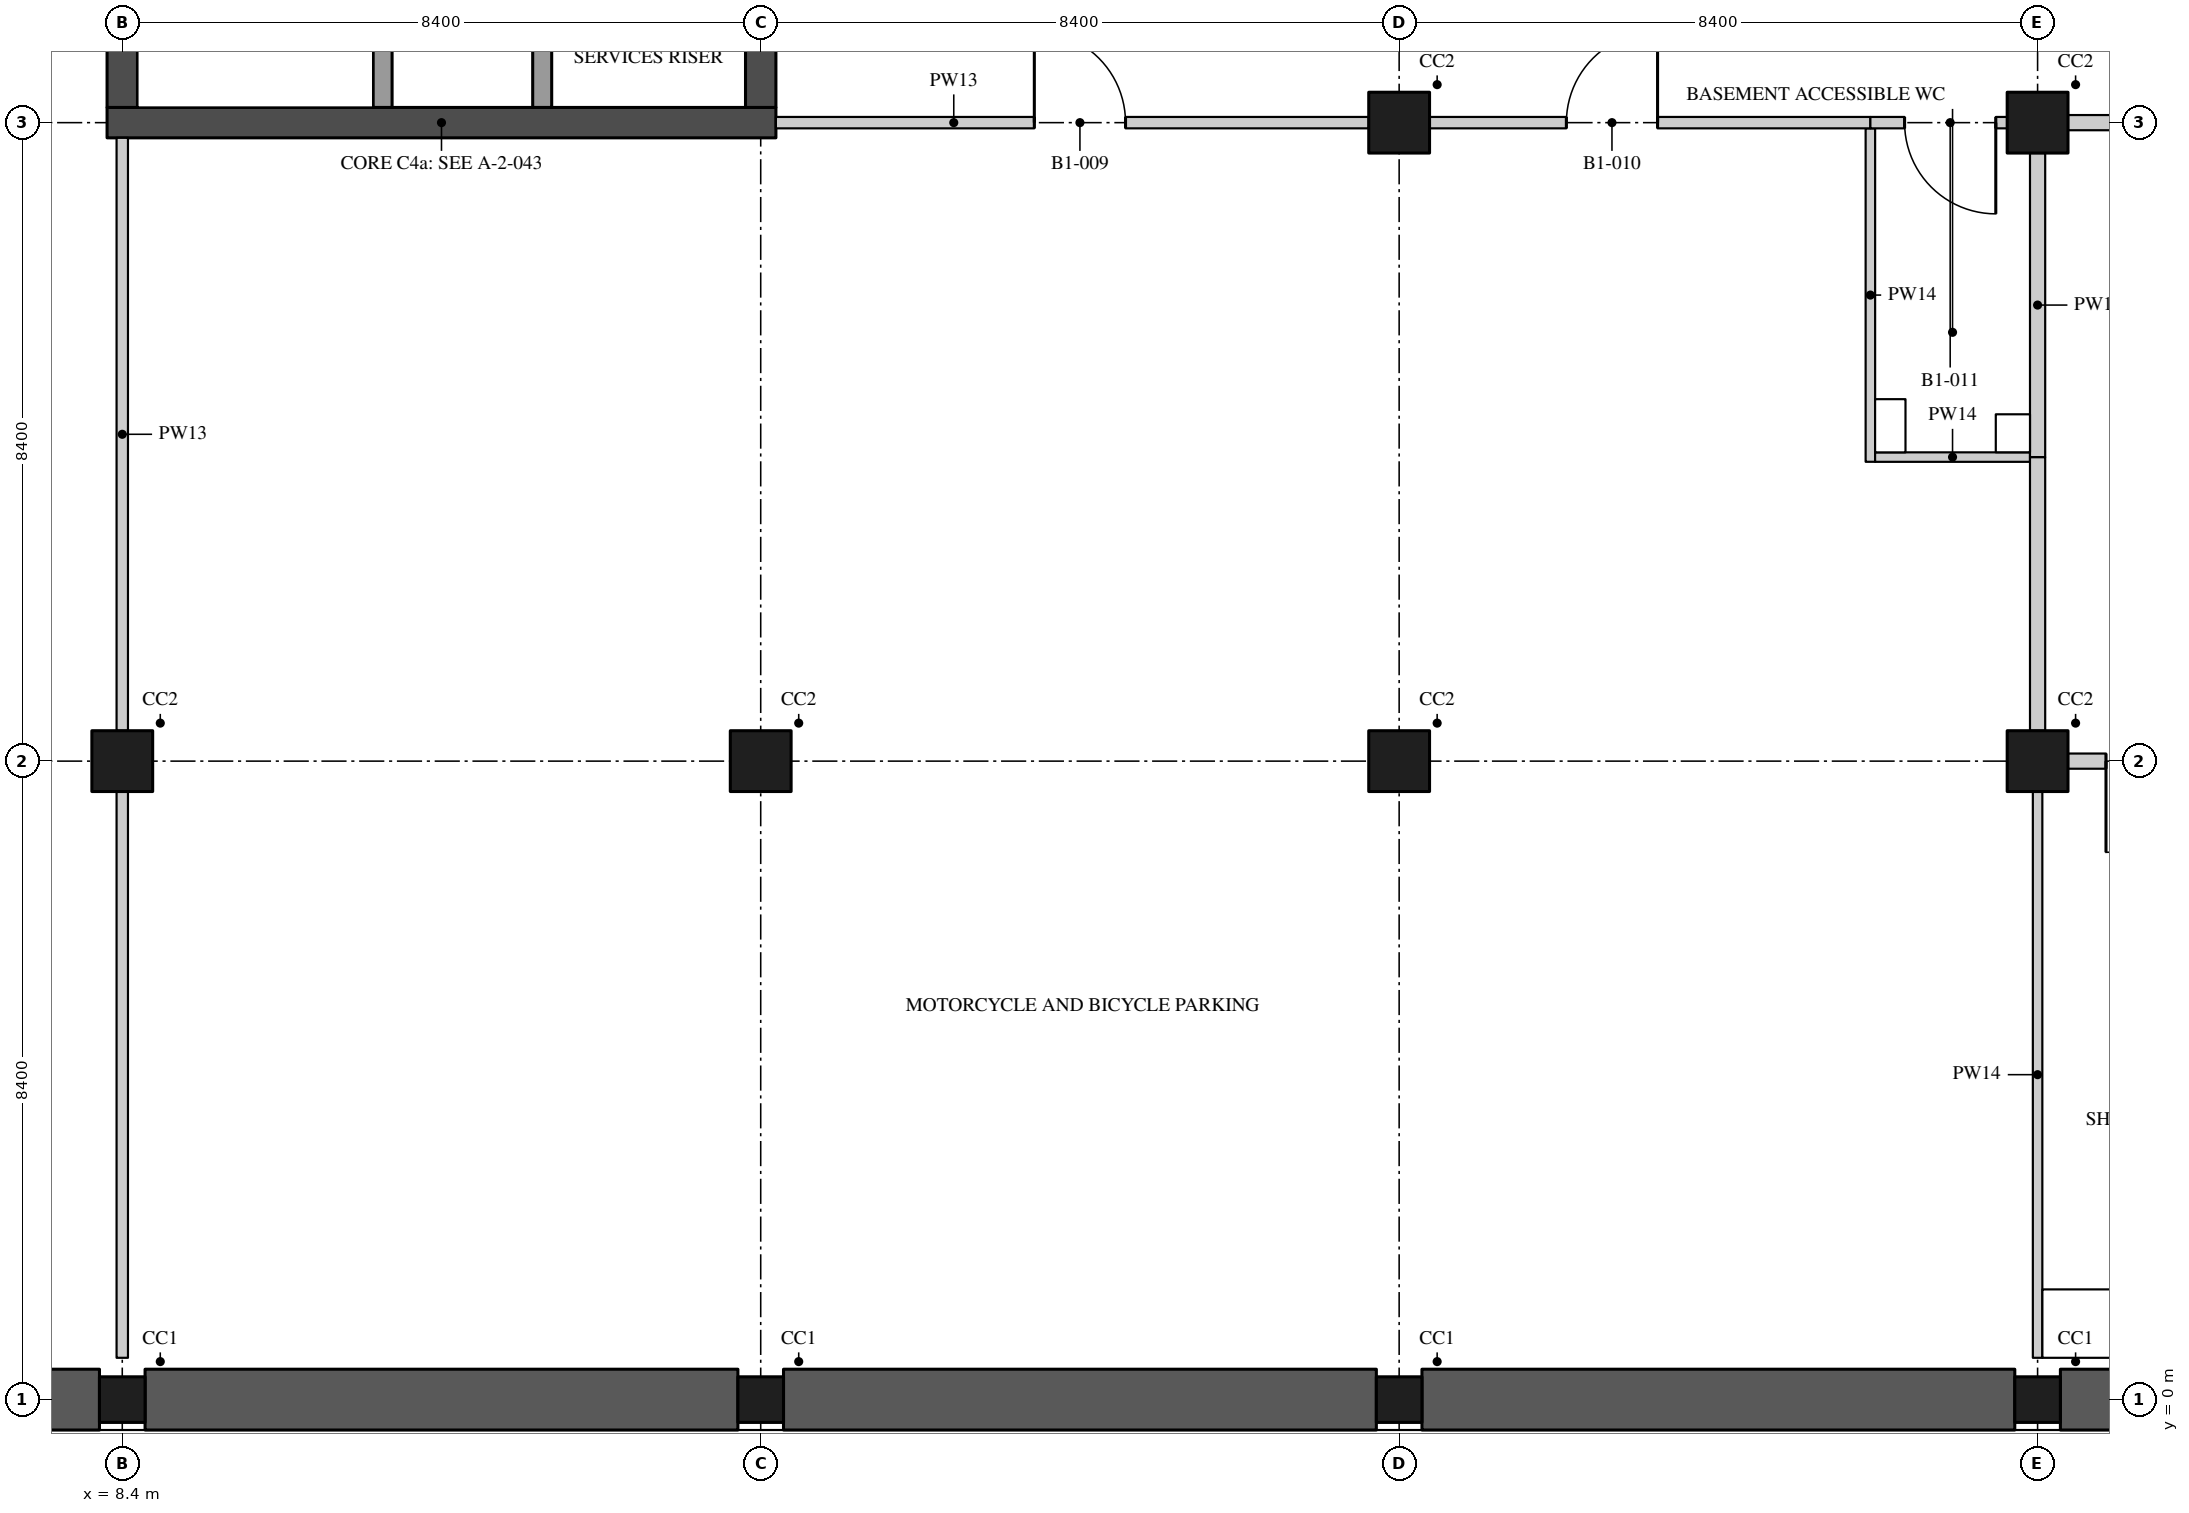
"""IFC4 building model, lengths in metres.
Left out: names, types, materials, properties, quantities, classifications, styles, units other than length and angle.
Written with IfcOpenShell. Run it as: python <this file> out.ifc"""

import sys

from ifc_helpers import new_model, si_unit, direction, frame, frame_2d, origin, origin_2d, place, context, subcontext, project, spatial, rectangle, extrude, element, fill, save


model = new_model("IFC4")
c1 = context("Model", 3, precision=1e-05, world=origin(), true_north=direction((0.0, 1.0)))
c2 = subcontext(c1, "Body", "Model", "MODEL_VIEW")
j1 = project(units=[si_unit("LENGTHUNIT", "METRE"), si_unit("PLANEANGLEUNIT", "RADIAN")], contexts=[c1])
p1 = place(None, origin())
s1 = spatial("IfcSite", under=j1, at=p1, CompositionType="ELEMENT")
p2 = place(p1, origin())
s2 = spatial("IfcBuilding", under=s1, at=p2, CompositionType="ELEMENT")
p3 = place(p2, frame((0.0, 0.0, -4.5)))
s3 = spatial("IfcBuildingStorey", under=s2, at=p3, CompositionType="ELEMENT", Elevation=-4.5)
p4 = place(p3, frame((8.4, 0.0, 0.0), z_axis=(0.0, 0.0, 1.0), x_axis=(1.0, 0.0, 0.0)))
e1 = element("IfcColumn", 1, at=p4, inside=s3, PredefinedType="COLUMN", context=c2, shape_type="SweptSolid", body=[
    extrude(rectangle(XDim=0.6, YDim=0.6, at=origin_2d()), origin(), (0.0, 0.0, 1.0), 4.05),
])
p5 = place(p3, frame((8.4, 8.4, 0.0), z_axis=(0.0, 0.0, 1.0), x_axis=(1.0, 0.0, 0.0)))
e2 = element("IfcColumn", 2, at=p5, inside=s3, PredefinedType="COLUMN", context=c2, shape_type="SweptSolid", body=[
    extrude(rectangle(XDim=0.8, YDim=0.8, at=origin_2d()), origin(), (0.0, 0.0, 1.0), 4.05),
])
p6 = place(p3, frame((16.8, 0.0, 0.0), z_axis=(0.0, 0.0, 1.0), x_axis=(1.0, 0.0, 0.0)))
e3 = element("IfcColumn", 3, at=p6, inside=s3, PredefinedType="COLUMN", context=c2, shape_type="SweptSolid", body=[
    extrude(rectangle(XDim=0.6, YDim=0.6, at=origin_2d()), origin(), (0.0, 0.0, 1.0), 4.05),
])
p7 = place(p3, frame((16.8, 8.4, 0.0), z_axis=(0.0, 0.0, 1.0), x_axis=(1.0, 0.0, 0.0)))
e4 = element("IfcColumn", 4, at=p7, inside=s3, PredefinedType="COLUMN", context=c2, shape_type="SweptSolid", body=[
    extrude(rectangle(XDim=0.8, YDim=0.8, at=origin_2d()), origin(), (0.0, 0.0, 1.0), 4.05),
])
p8 = place(p3, frame((25.2, 0.0, 0.0), z_axis=(0.0, 0.0, 1.0), x_axis=(1.0, 0.0, 0.0)))
e5 = element("IfcColumn", 5, at=p8, inside=s3, PredefinedType="COLUMN", context=c2, shape_type="SweptSolid", body=[
    extrude(rectangle(XDim=0.6, YDim=0.6, at=origin_2d()), origin(), (0.0, 0.0, 1.0), 4.05),
])
for number, where, z_axis, x_axis in (
    (6, (25.2, 8.4, 0.0), (0.0, 0.0, 1.0), (1.0, 0.0, 0.0)),
    (7, (25.2, 16.8, 0.0), (0.0, 0.0, 1.0), (1.0, 0.0, 0.0)),
):
    element("IfcColumn", number, at=place(p3, frame(where, z_axis=z_axis, x_axis=x_axis)), inside=s3, PredefinedType="COLUMN", context=c2, shape_type="SweptSolid", body=[
        extrude(rectangle(XDim=0.8, YDim=0.8, at=origin_2d()), origin(), (0.0, 0.0, 1.0), 4.05),
    ])
p9 = place(p3, frame((33.6, 0.0, 0.0), z_axis=(0.0, 0.0, 1.0), x_axis=(1.0, 0.0, 0.0)))
e8 = element("IfcColumn", 8, at=p9, inside=s3, PredefinedType="COLUMN", context=c2, shape_type="SweptSolid", body=[
    extrude(rectangle(XDim=0.6, YDim=0.6, at=origin_2d()), origin(), (0.0, 0.0, 1.0), 4.05),
])
for number, where, z_axis, x_axis in (
    (9, (33.6, 8.4, 0.0), (0.0, 0.0, 1.0), (1.0, 0.0, 0.0)),
    (10, (33.6, 16.8, 0.0), (0.0, 0.0, 1.0), (1.0, 0.0, 0.0)),
):
    element("IfcColumn", number, at=place(p3, frame(where, z_axis=z_axis, x_axis=x_axis)), inside=s3, PredefinedType="COLUMN", context=c2, shape_type="SweptSolid", body=[
        extrude(rectangle(XDim=0.8, YDim=0.8, at=origin_2d()), origin(), (0.0, 0.0, 1.0), 4.05),
    ])
for number, where, z_axis, x_axis in (
    (11, (0.3, 0.0, 0.0), (0.0, 0.0, 1.0), (1.0, 0.0, 0.0)),
    (12, (8.7, 0.0, 0.0), (0.0, 0.0, 1.0), (1.0, 0.0, 0.0)),
):
    element("IfcWall", number, at=place(p3, frame(where, z_axis=z_axis, x_axis=x_axis)), inside=s3, PredefinedType="SOLIDWALL", context=c2, shape_type="SweptSolid", body=[
        extrude(rectangle(XDim=7.8, YDim=0.8, at=frame_2d((3.9, 0.0))), origin(), (0.0, 0.0, 1.0), 4.05),
    ])
p10 = place(p3, frame((17.1, 0.0, 0.0), z_axis=(0.0, 0.0, 1.0), x_axis=(1.0, 0.0, 0.0)))
e13 = element("IfcWall", 13, at=p10, inside=s3, PredefinedType="SOLIDWALL", context=c2, shape_type="SweptSolid", body=[
    extrude(rectangle(XDim=7.8, YDim=0.8, at=frame_2d((3.9, 0.0))), origin(), (0.0, 0.0, 1.0), 4.05),
])
for number, where, z_axis, x_axis in (
    (14, (25.5, 0.0, 0.0), (0.0, 0.0, 1.0), (1.0, 0.0, 0.0)),
    (15, (33.9, 0.0, 0.0), (0.0, 0.0, 1.0), (1.0, 0.0, 0.0)),
):
    element("IfcWall", number, at=place(p3, frame(where, z_axis=z_axis, x_axis=x_axis)), inside=s3, PredefinedType="SOLIDWALL", context=c2, shape_type="SweptSolid", body=[
        extrude(rectangle(XDim=7.8, YDim=0.8, at=frame_2d((3.9, 0.0))), origin(), (0.0, 0.0, 1.0), 4.05),
    ])
p11 = place(p3, frame((8.2, 16.8, 0.0), z_axis=(0.0, 0.0, 1.0), x_axis=(1.0, 0.0, 0.0)))
e16 = element("IfcWall", 16, at=p11, inside=s3, PredefinedType="SHEAR", context=c2, shape_type="SweptSolid", body=[
    extrude(rectangle(XDim=8.8, YDim=0.4, at=frame_2d((4.4, 0.0))), origin(), (0.0, 0.0, 1.0), 4.05),
])
p12 = place(p3, frame((8.4, 17.0, 0.0), z_axis=(0.0, 0.0, 1.0), x_axis=(0.0, 1.0, 0.0)))
e17 = element("IfcWall", 17, at=p12, inside=s3, PredefinedType="SHEAR", context=c2, shape_type="SweptSolid", body=[
    extrude(rectangle(XDim=8.0, YDim=0.4, at=frame_2d((4.0, 0.0))), origin(), (0.0, 0.0, 1.0), 4.05),
])
p13 = place(p3, frame((16.8, 17.0, 0.0), z_axis=(0.0, 0.0, 1.0), x_axis=(0.0, 1.0, 0.0)))
e18 = element("IfcWall", 18, at=p13, inside=s3, PredefinedType="SHEAR", context=c2, shape_type="SweptSolid", body=[
    extrude(rectangle(XDim=8.0, YDim=0.4, at=frame_2d((4.0, 0.0))), origin(), (0.0, 0.0, 1.0), 4.05),
])
p14 = place(p13, frame((6.2, 0.0, 0.0)))
e19 = element("IfcOpeningElement", 19, at=p14, cuts=e18, PredefinedType="OPENING", context=c2, shape_type="SweptSolid", body=[
    extrude(rectangle(XDim=1.2, YDim=2.1, at=frame_2d((0.6, 1.05))), frame((0.0, 0.21, 0.0), z_axis=(0.0, -1.0, 0.0), x_axis=(1.0, 0.0, 0.0)), (0.0, 0.0, 1.0), 0.42),
])
p15 = place(p3, frame((11.825, 25.0, 0.0), z_axis=(0.0, 0.0, 1.0), x_axis=(0.0, -1.0, 0.0)))
e20 = element("IfcWall", 20, at=p15, inside=s3, PredefinedType="SOLIDWALL", context=c2, shape_type="SweptSolid", body=[
    extrude(rectangle(XDim=8.0, YDim=0.25, at=frame_2d((4.0, 0.0))), origin(), (0.0, 0.0, 1.0), 4.05),
])
p16 = place(p15, frame((0.2, 0.0, 0.0)))
e21 = element("IfcOpeningElement", 21, at=p16, cuts=e20, PredefinedType="OPENING", context=c2, shape_type="SweptSolid", body=[
    extrude(rectangle(XDim=1.1, YDim=2.1, at=frame_2d((0.55, 1.05))), frame((0.0, 0.135, 0.0), z_axis=(0.0, -1.0, 0.0), x_axis=(1.0, 0.0, 0.0)), (0.0, 0.0, 1.0), 0.27),
])
p17 = place(p3, frame((13.925, 19.95, 0.0), z_axis=(0.0, 0.0, 1.0), x_axis=(0.0, -1.0, 0.0)))
e22 = element("IfcWall", 22, at=p17, inside=s3, PredefinedType="SOLIDWALL", context=c2, shape_type="SweptSolid", body=[
    extrude(rectangle(XDim=2.95, YDim=0.25, at=frame_2d((1.475, 0.0))), origin(), (0.0, 0.0, 1.0), 4.05),
])
p18 = place(p17, frame((1.075, 0.0, 0.0)))
e23 = element("IfcOpeningElement", 23, at=p18, cuts=e22, PredefinedType="OPENING", context=c2, shape_type="SweptSolid", body=[
    extrude(rectangle(XDim=0.8, YDim=2.1, at=frame_2d((0.4, 1.05))), frame((0.0, 0.135, 0.0), z_axis=(0.0, -1.0, 0.0), x_axis=(1.0, 0.0, 0.0)), (0.0, 0.0, 1.0), 0.27),
])
p19 = place(p3, frame((31.4, 12.338, 0.0), z_axis=(0.0, 0.0, 1.0), x_axis=(0.0, 1.0, 0.0)))
e24 = element("IfcWall", 24, at=p19, inside=s3, PredefinedType="PARTITIONING", context=c2, shape_type="SweptSolid", body=[
    extrude(rectangle(XDim=4.387, YDim=0.125, at=frame_2d((2.194, 0.0))), origin(), (0.0, 0.0, 1.0), 4.05),
])
p20 = place(p3, frame((31.462, 12.4, 0.0), z_axis=(0.0, 0.0, 1.0), x_axis=(1.0, 0.0, 0.0)))
e25 = element("IfcWall", 25, at=p20, inside=s3, PredefinedType="PARTITIONING", context=c2, shape_type="SweptSolid", body=[
    extrude(rectangle(XDim=2.038, YDim=0.125, at=frame_2d((1.019, 0.0))), origin(), (0.0, 0.0, 1.0), 4.05),
])
p21 = place(p3, frame((33.6, 8.8, 0.0), z_axis=(0.0, 0.0, 1.0), x_axis=(0.0, 1.0, 0.0)))
e26 = element("IfcWall", 26, at=p21, inside=s3, PredefinedType="PARTITIONING", context=c2, shape_type="SweptSolid", body=[
    extrude(rectangle(XDim=3.6, YDim=0.2, at=frame_2d((1.8, 0.0))), origin(), (0.0, 0.0, 1.0), 4.05),
])
p22 = place(p3, frame((33.6, 0.55, 0.0), z_axis=(0.0, 0.0, 1.0), x_axis=(0.0, 1.0, 0.0)))
e27 = element("IfcWall", 27, at=p22, inside=s3, PredefinedType="PARTITIONING", context=c2, shape_type="SweptSolid", body=[
    extrude(rectangle(XDim=7.45, YDim=0.125, at=frame_2d((3.725, 0.0))), origin(), (0.0, 0.0, 1.0), 4.05),
])
p23 = place(p3, frame((8.4, 0.55, 0.0), z_axis=(0.0, 0.0, 1.0), x_axis=(0.0, 1.0, 0.0)))
e28 = element("IfcWall", 28, at=p23, inside=s3, PredefinedType="PARTITIONING", context=c2, shape_type="SweptSolid", body=[
    extrude(rectangle(XDim=7.45, YDim=0.15, at=frame_2d((3.725, 0.0))), origin(), (0.0, 0.0, 1.0), 4.05),
])
p24 = place(p3, frame((8.4, 8.8, 0.0), z_axis=(0.0, 0.0, 1.0), x_axis=(0.0, 1.0, 0.0)))
e29 = element("IfcWall", 29, at=p24, inside=s3, PredefinedType="PARTITIONING", context=c2, shape_type="SweptSolid", body=[
    extrude(rectangle(XDim=7.8, YDim=0.15, at=frame_2d((3.9, 0.0))), origin(), (0.0, 0.0, 1.0), 4.05),
])
p25 = place(p3, frame((17.0, 16.8, 0.0), z_axis=(0.0, 0.0, 1.0), x_axis=(1.0, 0.0, 0.0)))
e30 = element("IfcWall", 30, at=p25, inside=s3, PredefinedType="PARTITIONING", context=c2, shape_type="SweptSolid", body=[
    extrude(rectangle(XDim=7.8, YDim=0.15, at=frame_2d((3.9, 0.0))), origin(), (0.0, 0.0, 1.0), 4.05),
])
p26 = place(p25, frame((3.4, 0.0, 0.0)))
e31 = element("IfcOpeningElement", 31, at=p26, cuts=e30, PredefinedType="OPENING", context=c2, shape_type="SweptSolid", body=[
    extrude(rectangle(XDim=1.2, YDim=2.1, at=frame_2d((0.6, 1.05))), frame((0.0, 0.085, 0.0), z_axis=(0.0, -1.0, 0.0), x_axis=(1.0, 0.0, 0.0)), (0.0, 0.0, 1.0), 0.17),
])
p27 = place(p3, frame((25.6, 16.8, 0.0), z_axis=(0.0, 0.0, 1.0), x_axis=(1.0, 0.0, 0.0)))
e32 = element("IfcWall", 32, at=p27, inside=s3, PredefinedType="PARTITIONING", context=c2, shape_type="SweptSolid", body=[
    extrude(rectangle(XDim=5.8, YDim=0.15, at=frame_2d((2.9, 0.0))), origin(), (0.0, 0.0, 1.0), 4.05),
])
p28 = place(p27, frame((1.8, 0.0, 0.0)))
e33 = element("IfcOpeningElement", 33, at=p28, cuts=e32, PredefinedType="OPENING", context=c2, shape_type="SweptSolid", body=[
    extrude(rectangle(XDim=1.2, YDim=2.1, at=frame_2d((0.6, 1.05))), frame((0.0, 0.085, 0.0), z_axis=(0.0, -1.0, 0.0), x_axis=(1.0, 0.0, 0.0)), (0.0, 0.0, 1.0), 0.17),
])
p29 = place(p3, frame((33.6, 12.4, 0.0), z_axis=(0.0, 0.0, 1.0), x_axis=(0.0, 1.0, 0.0)))
e34 = element("IfcWall", 34, at=p29, inside=s3, PredefinedType="PARTITIONING", context=c2, shape_type="SweptSolid", body=[
    extrude(rectangle(XDim=4.0, YDim=0.2, at=frame_2d((2.0, 0.0))), origin(), (0.0, 0.0, 1.0), 4.05),
])
p30 = place(p3, frame((31.4, 16.8, 0.0), z_axis=(0.0, 0.0, 1.0), x_axis=(1.0, 0.0, 0.0)))
e35 = element("IfcWall", 35, at=p30, inside=s3, PredefinedType="PARTITIONING", context=c2, shape_type="SweptSolid", body=[
    extrude(rectangle(XDim=1.8, YDim=0.15, at=frame_2d((0.9, 0.0))), origin(), (0.0, 0.0, 1.0), 4.05),
])
p31 = place(p30, frame((0.45, 0.0, 0.0)))
e36 = element("IfcOpeningElement", 36, at=p31, cuts=e35, PredefinedType="OPENING", context=c2, shape_type="SweptSolid", body=[
    extrude(rectangle(XDim=1.2, YDim=2.1, at=frame_2d((0.6, 1.05))), frame((0.0, 0.085, 0.0), z_axis=(0.0, -1.0, 0.0), x_axis=(1.0, 0.0, 0.0)), (0.0, 0.0, 1.0), 0.17),
])
p32 = place(p3, frame((34.0, 8.4, 0.0), z_axis=(0.0, 0.0, 1.0), x_axis=(1.0, 0.0, 0.0)))
e37 = element("IfcWall", 37, at=p32, inside=s3, PredefinedType="PARTITIONING", context=c2, shape_type="SweptSolid", body=[
    extrude(rectangle(XDim=2.75, YDim=0.2, at=frame_2d((1.375, 0.0))), origin(), (0.0, 0.0, 1.0), 4.05),
])
p33 = place(p32, frame((0.5, 0.0, 0.0)))
e38 = element("IfcOpeningElement", 38, at=p33, cuts=e37, PredefinedType="OPENING", context=c2, shape_type="SweptSolid", body=[
    extrude(rectangle(XDim=1.2, YDim=2.1, at=frame_2d((0.6, 1.05))), frame((0.0, 0.11, 0.0), z_axis=(0.0, -1.0, 0.0), x_axis=(1.0, 0.0, 0.0)), (0.0, 0.0, 1.0), 0.22),
])
p34 = place(p3, frame((34.0, 16.8, 0.0), z_axis=(0.0, 0.0, 1.0), x_axis=(1.0, 0.0, 0.0)))
e39 = element("IfcWall", 39, at=p34, inside=s3, PredefinedType="PARTITIONING", context=c2, shape_type="SweptSolid", body=[
    extrude(rectangle(XDim=5.9, YDim=0.2, at=frame_2d((2.95, 0.0))), origin(), (0.0, 0.0, 1.0), 4.05),
])
p35 = place(p34, frame((2.4, 0.0, 0.0)))
e40 = element("IfcOpeningElement", 40, at=p35, cuts=e39, PredefinedType="OPENING", context=c2, shape_type="SweptSolid", body=[
    extrude(rectangle(XDim=1.2, YDim=2.1, at=frame_2d((0.6, 1.05))), frame((0.0, 0.11, 0.0), z_axis=(0.0, -1.0, 0.0), x_axis=(1.0, 0.0, 0.0)), (0.0, 0.0, 1.0), 0.22),
])
p36 = place(p26, origin())
e41 = element("IfcDoor", 41, at=p36, inside=s3, OperationType="SINGLE_SWING_RIGHT", PredefinedType="DOOR", context=c2, shape_type="SweptSolid", body=[
    extrude(rectangle(XDim=1.2, YDim=2.1, at=frame_2d((0.6, 1.05))), frame((0.0, 0.03, 0.0), z_axis=(0.0, -1.0, 0.0), x_axis=(1.0, 0.0, 0.0)), (0.0, 0.0, 1.0), 0.06),
])
fill(e31, e41)
p37 = place(p28, origin())
e42 = element("IfcDoor", 42, at=p37, inside=s3, OperationType="SINGLE_SWING_LEFT", PredefinedType="DOOR", context=c2, shape_type="SweptSolid", body=[
    extrude(rectangle(XDim=1.2, YDim=2.1, at=frame_2d((0.6, 1.05))), frame((0.0, 0.03, 0.0), z_axis=(0.0, -1.0, 0.0), x_axis=(1.0, 0.0, 0.0)), (0.0, 0.0, 1.0), 0.06),
])
fill(e33, e42)
p38 = place(p31, frame((1.2, 0.0, 0.0), z_axis=(0.0, 0.0, 1.0), x_axis=(-1.0, 0.0, 0.0)))
e43 = element("IfcDoor", 43, at=p38, inside=s3, OperationType="SINGLE_SWING_RIGHT", PredefinedType="DOOR", context=c2, shape_type="SweptSolid", body=[
    extrude(rectangle(XDim=1.2, YDim=2.1, at=frame_2d((0.6, 1.05))), frame((0.0, 0.03, 0.0), z_axis=(0.0, -1.0, 0.0), x_axis=(1.0, 0.0, 0.0)), (0.0, 0.0, 1.0), 0.06),
])
fill(e36, e43)
p39 = place(p33, frame((1.2, 0.0, 0.0), z_axis=(0.0, 0.0, 1.0), x_axis=(-1.0, 0.0, 0.0)))
e44 = element("IfcDoor", 44, at=p39, inside=s3, OperationType="SINGLE_SWING_LEFT", PredefinedType="DOOR", context=c2, shape_type="SweptSolid", body=[
    extrude(rectangle(XDim=1.2, YDim=2.1, at=frame_2d((0.6, 1.05))), frame((0.0, 0.035, 0.0), z_axis=(0.0, -1.0, 0.0), x_axis=(1.0, 0.0, 0.0)), (0.0, 0.0, 1.0), 0.07),
])
fill(e38, e44)
save(model, sys.argv[1])
